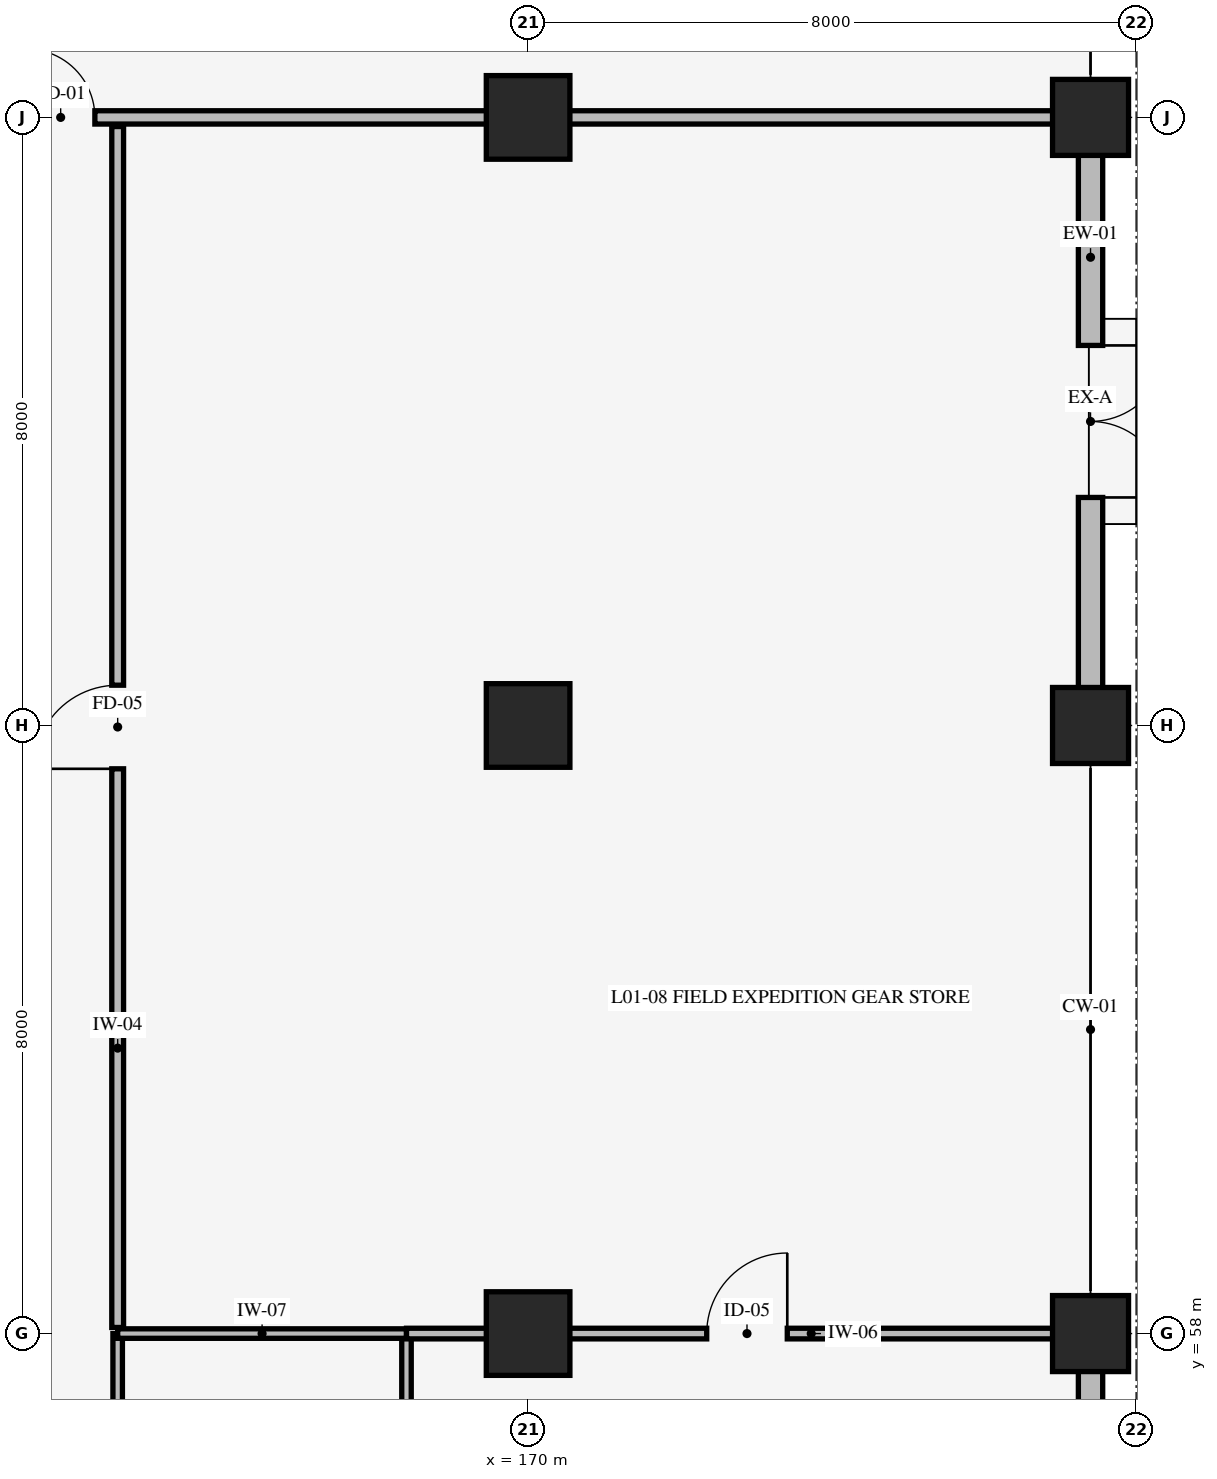
"""IFC4 building model, lengths in metres.
Left out: names, types, materials, properties, quantities, classifications, styles, units other than length and angle.
Written with IfcOpenShell. Run it as: python <this file> out.ifc"""

import sys

from ifc_helpers import new_model, si_unit, direction, frame, frame_2d, origin, origin_2d, place, context, subcontext, project, spatial, rectangle, extrude, element, fill, save


model = new_model("IFC4")
c1 = context("Model", 3, precision=1e-05, world=origin(), true_north=direction((0.0, 1.0)))
c2 = subcontext(c1, "Body", "Model", "MODEL_VIEW")
j1 = project(units=[si_unit("LENGTHUNIT", "METRE"), si_unit("PLANEANGLEUNIT", "RADIAN")], contexts=[c1])
p1 = place(None, origin())
s1 = spatial("IfcSite", under=j1, at=p1, CompositionType="ELEMENT")
p2 = place(p1, origin())
s2 = spatial("IfcBuilding", under=s1, at=p2, CompositionType="ELEMENT")
p3 = place(p2, origin())
s3 = spatial("IfcBuildingStorey", under=s2, at=p3, CompositionType="ELEMENT", Elevation=0.0)
for number, where, z_axis, x_axis in (
    (1, (170.0, 58.0, 0.0), (0.0, 0.0, 1.0), (1.0, 0.0, 0.0)),
    (2, (170.0, 66.0, 0.0), (0.0, 0.0, 1.0), (1.0, 0.0, 0.0)),
    (3, (170.0, 74.0, 0.0), (0.0, 0.0, 1.0), (1.0, 0.0, 0.0)),
):
    element("IfcColumn", number, at=place(p3, frame(where, z_axis=z_axis, x_axis=x_axis)), inside=s3, PredefinedType="COLUMN", context=c2, shape_type="SweptSolid", body=[
        extrude(rectangle(XDim=1.1, YDim=1.1, at=origin_2d()), origin(), (0.0, 0.0, 1.0), 5.4),
    ])
for number, where, z_axis, x_axis in (
    (4, (177.4, 58.0, 0.0), (0.0, 0.0, 1.0), (1.0, 0.0, 0.0)),
    (5, (177.4, 66.0, 0.0), (0.0, 0.0, 1.0), (1.0, 0.0, 0.0)),
    (6, (177.4, 74.0, 0.0), (0.0, 0.0, 1.0), (1.0, 0.0, 0.0)),
):
    element("IfcColumn", number, at=place(p3, frame(where, z_axis=z_axis, x_axis=x_axis)), inside=s3, PredefinedType="COLUMN", context=c2, shape_type="SweptSolid", body=[
        extrude(rectangle(XDim=1.0, YDim=1.0, at=origin_2d()), origin(), (0.0, 0.0, 1.0), 5.4),
    ])
p4 = place(p3, frame((177.4, 74.0, 0.0), z_axis=(0.0, 0.0, 1.0), x_axis=(0.0, -1.0, 0.0)))
e7 = element("IfcWall", 7, at=p4, inside=s3, PredefinedType="STANDARD", context=c2, shape_type="SweptSolid", body=[
    extrude(rectangle(XDim=8.0, YDim=0.32, at=frame_2d((4.0, 0.0))), origin(), (0.0, 0.0, 1.0), 4.15),
])
p5 = place(p4, frame((3.0, 0.0, 0.0)))
e8 = element("IfcOpeningElement", 8, at=p5, cuts=e7, PredefinedType="OPENING", context=c2, shape_type="SweptSolid", body=[
    extrude(rectangle(XDim=2.0, YDim=2.4, at=frame_2d((1.0, 1.2))), frame((0.0, 0.17, 0.0), z_axis=(0.0, -1.0, 0.0), x_axis=(1.0, 0.0, 0.0)), (0.0, 0.0, 1.0), 0.34),
])
p6 = place(p3, frame((177.4, 58.0, 0.0), z_axis=(0.0, 0.0, 1.0), x_axis=(0.0, -1.0, 0.0)))
e9 = element("IfcWall", 9, at=p6, inside=s3, PredefinedType="STANDARD", context=c2, shape_type="SweptSolid", body=[
    extrude(rectangle(XDim=8.0, YDim=0.32, at=frame_2d((4.0, 0.0))), origin(), (0.0, 0.0, 1.0), 4.15),
])
p7 = place(p6, frame((3.4, 0.0, 0.85)))
e10 = element("IfcOpeningElement", 10, at=p7, cuts=e9, PredefinedType="OPENING", context=c2, shape_type="SweptSolid", body=[
    extrude(rectangle(XDim=1.2, YDim=1.2, at=frame_2d((0.6, 0.6))), frame((0.0, 0.17, 0.0), z_axis=(0.0, -1.0, 0.0), x_axis=(1.0, 0.0, 0.0)), (0.0, 0.0, 1.0), 0.34),
])
p8 = place(p3, frame((164.6, 50.0, 0.0), z_axis=(0.0, 0.0, 1.0), x_axis=(0.0, 1.0, 0.0)))
e11 = element("IfcWall", 11, at=p8, inside=s3, PredefinedType="STANDARD", context=c2, shape_type="SweptSolid", body=[
    extrude(rectangle(XDim=8.0, YDim=0.125, at=frame_2d((4.0, 0.0))), origin(), (0.0, 0.0, 1.0), 5.1),
])
p9 = place(p8, frame((0.9, 0.0, 0.0)))
e12 = element("IfcOpeningElement", 12, at=p9, cuts=e11, PredefinedType="OPENING", context=c2, shape_type="SweptSolid", body=[
    extrude(rectangle(XDim=0.96, YDim=2.08, at=frame_2d((0.48, 1.04))), frame((0.0, 0.073, 0.0), z_axis=(0.0, -1.0, 0.0), x_axis=(1.0, 0.0, 0.0)), (0.0, 0.0, 1.0), 0.145),
])
p10 = place(p8, frame((3.55, 0.0, 0.0)))
e13 = element("IfcOpeningElement", 13, at=p10, cuts=e11, PredefinedType="OPENING", context=c2, shape_type="SweptSolid", body=[
    extrude(rectangle(XDim=0.88, YDim=2.05, at=frame_2d((0.44, 1.025))), frame((0.0, 0.073, 0.0), z_axis=(0.0, -1.0, 0.0), x_axis=(1.0, 0.0, 0.0)), (0.0, 0.0, 1.0), 0.145),
])
p11 = place(p8, frame((6.15, 0.0, 0.0)))
e14 = element("IfcOpeningElement", 14, at=p11, cuts=e11, PredefinedType="OPENING", context=c2, shape_type="SweptSolid", body=[
    extrude(rectangle(XDim=0.92, YDim=2.05, at=frame_2d((0.46, 1.025))), frame((0.0, 0.073, 0.0), z_axis=(0.0, -1.0, 0.0), x_axis=(1.0, 0.0, 0.0)), (0.0, 0.0, 1.0), 0.145),
])
p12 = place(p3, frame((168.4, 50.0, 0.0), z_axis=(0.0, 0.0, 1.0), x_axis=(0.0, 1.0, 0.0)))
e15 = element("IfcWall", 15, at=p12, inside=s3, PredefinedType="STANDARD", context=c2, shape_type="SweptSolid", body=[
    extrude(rectangle(XDim=8.0, YDim=0.125, at=frame_2d((4.0, 0.0))), origin(), (0.0, 0.0, 1.0), 5.1),
])
p13 = place(p3, frame((164.6, 58.0, 0.0), z_axis=(0.0, 0.0, 1.0), x_axis=(1.0, 0.0, 0.0)))
e16 = element("IfcWall", 16, at=p13, inside=s3, PredefinedType="STANDARD", context=c2, shape_type="SweptSolid", body=[
    extrude(rectangle(XDim=3.8, YDim=0.125, at=frame_2d((1.9, 0.0))), origin(), (0.0, 0.0, 1.0), 4.2),
])
p14 = place(p3, frame((168.4, 58.0, 0.0), z_axis=(0.0, 0.0, 1.0), x_axis=(1.0, 0.0, 0.0)))
e17 = element("IfcWall", 17, at=p14, inside=s3, PredefinedType="STANDARD", context=c2, shape_type="SweptSolid", body=[
    extrude(rectangle(XDim=8.96, YDim=0.14, at=frame_2d((4.48, 0.0))), origin(), (0.0, 0.0, 1.0), 4.2),
])
p15 = place(p14, frame((3.95, 0.0, 0.0)))
e18 = element("IfcOpeningElement", 18, at=p15, cuts=e17, PredefinedType="OPENING", context=c2, shape_type="SweptSolid", body=[
    extrude(rectangle(XDim=1.06, YDim=2.12, at=frame_2d((0.53, 1.06))), frame((0.0, 0.08, 0.0), z_axis=(0.0, -1.0, 0.0), x_axis=(1.0, 0.0, 0.0)), (0.0, 0.0, 1.0), 0.16),
])
p16 = place(p3, frame((164.6, 58.08, 0.0), z_axis=(0.0, 0.0, 1.0), x_axis=(0.0, 1.0, 0.0)))
e19 = element("IfcWall", 19, at=p16, inside=s3, PredefinedType="STANDARD", context=c2, shape_type="SweptSolid", body=[
    extrude(rectangle(XDim=15.8, YDim=0.155, at=frame_2d((7.9, 0.0))), origin(), (0.0, 0.0, 1.0), 5.1),
])
p17 = place(p16, frame((7.35, 0.0, 0.0)))
e20 = element("IfcOpeningElement", 20, at=p17, cuts=e19, PredefinedType="OPENING", context=c2, shape_type="SweptSolid", body=[
    extrude(rectangle(XDim=1.1, YDim=2.1, at=frame_2d((0.55, 1.05))), frame((0.0, 0.087, 0.0), z_axis=(0.0, -1.0, 0.0), x_axis=(1.0, 0.0, 0.0)), (0.0, 0.0, 1.0), 0.175),
])
p18 = place(p3, frame((162.35, 74.0, 0.0), z_axis=(0.0, 0.0, 1.0), x_axis=(1.0, 0.0, 0.0)))
e21 = element("IfcWall", 21, at=p18, inside=s3, PredefinedType="STANDARD", context=c2, shape_type="SweptSolid", body=[
    extrude(rectangle(XDim=14.7, YDim=0.175, at=frame_2d((7.35, 0.0))), origin(), (0.0, 0.0, 1.0), 4.2),
])
p19 = place(p18, frame((1.05, 0.0, 0.0)))
e22 = element("IfcOpeningElement", 22, at=p19, cuts=e21, PredefinedType="OPENING", context=c2, shape_type="SweptSolid", body=[
    extrude(rectangle(XDim=0.9, YDim=2.1, at=frame_2d((0.45, 1.05))), frame((0.0, 0.098, 0.0), z_axis=(0.0, -1.0, 0.0), x_axis=(1.0, 0.0, 0.0)), (0.0, 0.0, 1.0), 0.195),
])
p20 = place(p5, origin())
e23 = element("IfcDoor", 23, at=p20, inside=s3, OperationType="DOUBLE_DOOR_SINGLE_SWING", PredefinedType="DOOR", context=c2, shape_type="SweptSolid", body=[
    extrude(rectangle(XDim=2.0, YDim=2.4, at=frame_2d((1.0, 1.2))), frame((0.0, 0.025, 0.0), z_axis=(0.0, -1.0, 0.0), x_axis=(1.0, 0.0, 0.0)), (0.0, 0.0, 1.0), 0.05),
])
fill(e8, e23)
p21 = place(p15, origin())
e24 = element("IfcDoor", 24, at=p21, inside=s3, OperationType="SINGLE_SWING_RIGHT", PredefinedType="DOOR", context=c2, shape_type="SweptSolid", body=[
    extrude(rectangle(XDim=1.06, YDim=2.12, at=frame_2d((0.53, 1.06))), frame((0.0, 0.025, 0.0), z_axis=(0.0, -1.0, 0.0), x_axis=(1.0, 0.0, 0.0)), (0.0, 0.0, 1.0), 0.05),
])
fill(e18, e24)
p22 = place(p17, origin())
e25 = element("IfcDoor", 25, at=p22, inside=s3, OperationType="SINGLE_SWING_LEFT", PredefinedType="DOOR", context=c2, shape_type="SweptSolid", body=[
    extrude(rectangle(XDim=1.1, YDim=2.1, at=frame_2d((0.55, 1.05))), frame((0.0, 0.025, 0.0), z_axis=(0.0, -1.0, 0.0), x_axis=(1.0, 0.0, 0.0)), (0.0, 0.0, 1.0), 0.05),
])
fill(e20, e25)
p23 = place(p19, origin())
e26 = element("IfcDoor", 26, at=p23, inside=s3, OperationType="SINGLE_SWING_LEFT", PredefinedType="DOOR", context=c2, shape_type="SweptSolid", body=[
    extrude(rectangle(XDim=0.9, YDim=2.1, at=frame_2d((0.45, 1.05))), frame((0.0, 0.025, 0.0), z_axis=(0.0, -1.0, 0.0), x_axis=(1.0, 0.0, 0.0)), (0.0, 0.0, 1.0), 0.05),
])
fill(e22, e26)
save(model, sys.argv[1])
